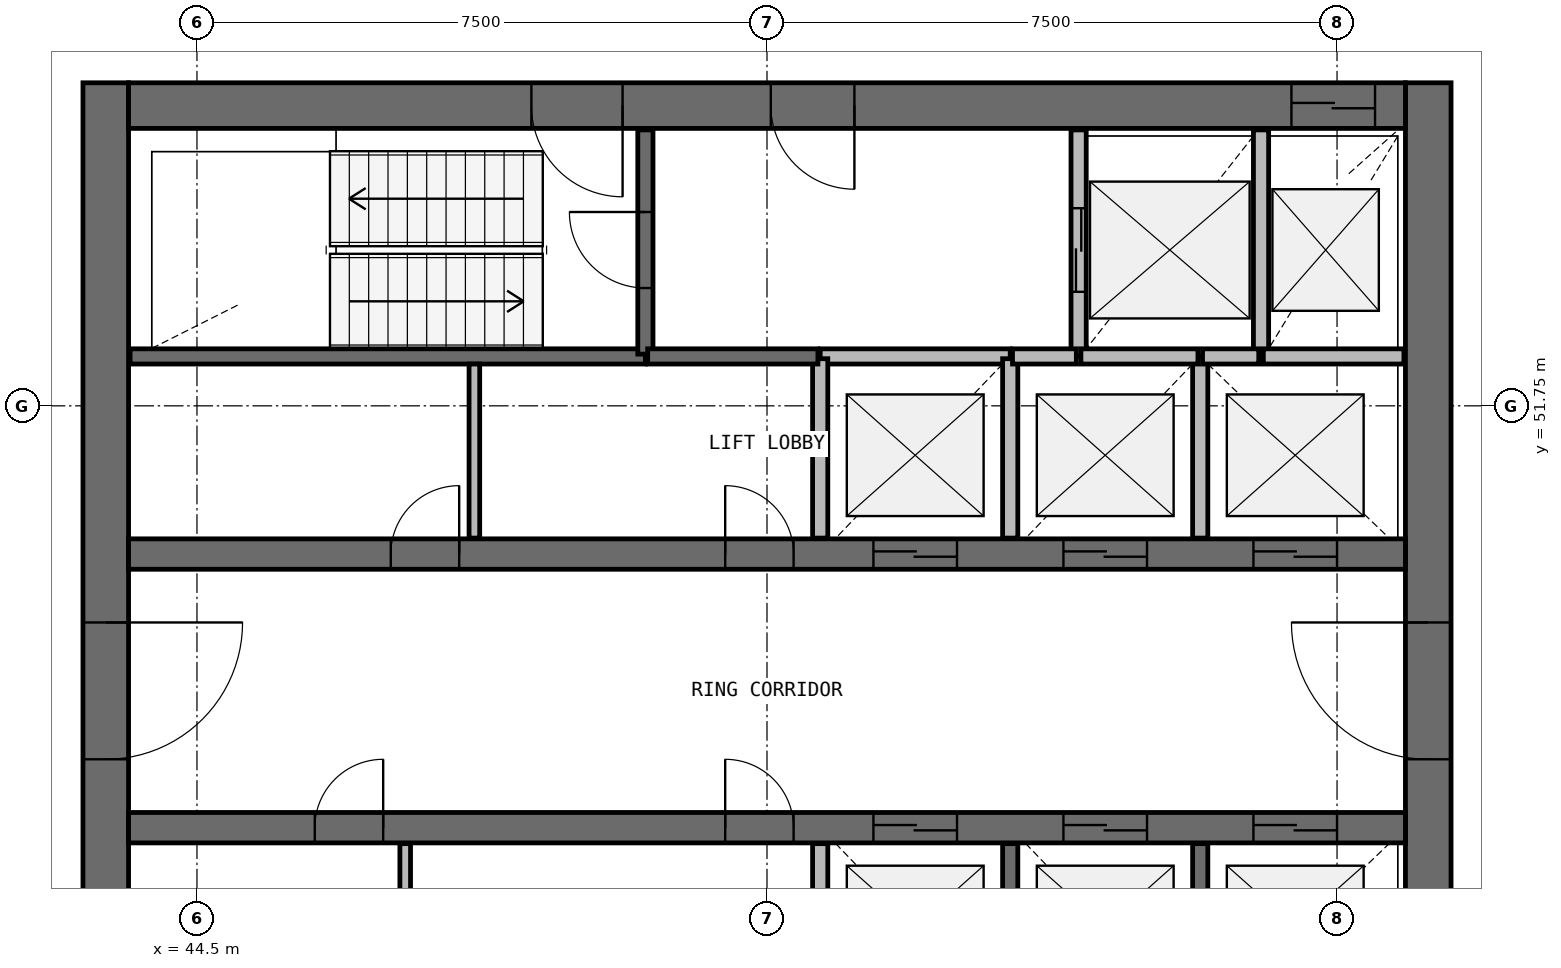
"""IFC4 building model, lengths in metres.
Left out: names, types, materials, properties, quantities, classifications, styles, units other than length and angle.
Written with IfcOpenShell. Run it as: python <this file> out.ifc"""

import sys

from ifc_helpers import new_model, si_unit, direction, frame, frame_2d, origin, place, context, subcontext, project, spatial, rectangle, extrude, source, transform, mapped, element, fill, save


model = new_model("IFC4")
c1 = context("Model", 3, precision=1e-05, world=origin(), true_north=direction((0.0, 1.0)))
c2 = subcontext(c1, "Body", "Model", "MODEL_VIEW")
j1 = project(units=[si_unit("LENGTHUNIT", "METRE"), si_unit("PLANEANGLEUNIT", "RADIAN")], contexts=[c1])
p1 = place(None, origin())
s1 = spatial("IfcSite", under=j1, at=p1, CompositionType="ELEMENT")
p2 = place(p1, origin())
s2 = spatial("IfcBuilding", under=s1, at=p2, CompositionType="ELEMENT")
p3 = place(p2, frame((0.0, 0.0, 207.2)))
s3 = spatial("IfcBuildingStorey", under=s2, at=p3, CompositionType="ELEMENT", Elevation=207.2)
p4 = place(p3, frame((60.7, 40.0, 0.0), z_axis=(0.0, 0.0, 1.0), x_axis=(0.0, 1.0, 0.0)))
e1 = element("IfcWall", 1, at=p4, inside=s3, PredefinedType="SHEAR", context=c2, shape_type="SweptSolid", body=[
    extrude(rectangle(XDim=16.0, YDim=0.6, at=frame_2d((8.0, 0.0))), origin(), (0.0, 0.0, 1.0), 3.9),
])
p5 = place(p4, frame((7.1, 0.0, 0.0)))
e2 = element("IfcOpeningElement", 2, at=p5, cuts=e1, PredefinedType="OPENING", context=c2, shape_type="SweptSolid", body=[
    extrude(rectangle(XDim=1.8, YDim=2.1, at=frame_2d((0.9, 1.05))), frame((0.0, 0.31, 0.0), z_axis=(0.0, -1.0, 0.0), x_axis=(1.0, 0.0, 0.0)), (0.0, 0.0, 1.0), 0.62),
])
p6 = place(p3, frame((43.3, 56.0, 0.0), z_axis=(0.0, 0.0, 1.0), x_axis=(0.0, -1.0, 0.0)))
e3 = element("IfcWall", 3, at=p6, inside=s3, PredefinedType="SHEAR", context=c2, shape_type="SweptSolid", body=[
    extrude(rectangle(XDim=16.0, YDim=0.6, at=frame_2d((8.0, 0.0))), origin(), (0.0, 0.0, 1.0), 3.9),
])
p7 = place(p6, frame((7.1, 0.0, 0.0)))
e4 = element("IfcOpeningElement", 4, at=p7, cuts=e3, PredefinedType="OPENING", context=c2, shape_type="SweptSolid", body=[
    extrude(rectangle(XDim=1.8, YDim=2.1, at=frame_2d((0.9, 1.05))), frame((0.0, 0.31, 0.0), z_axis=(0.0, -1.0, 0.0), x_axis=(1.0, 0.0, 0.0)), (0.0, 0.0, 1.0), 0.62),
])
p8 = place(p3, frame((60.4, 55.7, 0.0), z_axis=(0.0, 0.0, 1.0), x_axis=(-1.0, 0.0, 0.0)))
e5 = element("IfcWall", 5, at=p8, inside=s3, PredefinedType="SHEAR", context=c2, shape_type="SweptSolid", body=[
    extrude(rectangle(XDim=16.8, YDim=0.6, at=frame_2d((8.4, 0.0))), origin(), (0.0, 0.0, 1.0), 3.9),
])
p9 = place(p8, frame((0.4, 0.0, 0.0)))
e6 = element("IfcOpeningElement", 6, at=p9, cuts=e5, PredefinedType="OPENING", context=c2, shape_type="SweptSolid", body=[
    extrude(rectangle(XDim=1.1, YDim=2.1, at=frame_2d((0.55, 1.05))), frame((0.0, 0.31, 0.0), z_axis=(0.0, -1.0, 0.0), x_axis=(1.0, 0.0, 0.0)), (0.0, 0.0, 1.0), 0.62),
])
p10 = place(p8, frame((10.3, 0.0, 0.0)))
e7 = element("IfcOpeningElement", 7, at=p10, cuts=e5, PredefinedType="OPENING", context=c2, shape_type="SweptSolid", body=[
    extrude(rectangle(XDim=1.2, YDim=2.1, at=frame_2d((0.6, 1.05))), frame((0.0, 0.31, 0.0), z_axis=(0.0, -1.0, 0.0), x_axis=(1.0, 0.0, 0.0)), (0.0, 0.0, 1.0), 0.62),
])
p11 = place(p8, frame((7.25, 0.0, 0.0)))
e8 = element("IfcOpeningElement", 8, at=p11, cuts=e5, PredefinedType="OPENING", context=c2, shape_type="SweptSolid", body=[
    extrude(rectangle(XDim=1.1, YDim=2.1, at=frame_2d((0.55, 1.05))), frame((0.0, 0.31, 0.0), z_axis=(0.0, -1.0, 0.0), x_axis=(1.0, 0.0, 0.0)), (0.0, 0.0, 1.0), 0.62),
])
p12 = place(p3, frame((43.6, 49.8, 0.0), z_axis=(0.0, 0.0, 1.0), x_axis=(1.0, 0.0, 0.0)))
e9 = element("IfcWall", 9, at=p12, inside=s3, PredefinedType="SHEAR", context=c2, shape_type="SweptSolid", body=[
    extrude(rectangle(XDim=16.8, YDim=0.4, at=frame_2d((8.4, 0.0))), origin(), (0.0, 0.0, 1.0), 3.9),
])
p13 = place(p12, frame((9.8, 0.0, 0.0)))
e10 = element("IfcOpeningElement", 10, at=p13, cuts=e9, PredefinedType="OPENING", context=c2, shape_type="SweptSolid", body=[
    extrude(rectangle(XDim=1.1, YDim=2.1, at=frame_2d((0.55, 1.05))), frame((0.0, 0.21, 0.0), z_axis=(0.0, -1.0, 0.0), x_axis=(1.0, 0.0, 0.0)), (0.0, 0.0, 1.0), 0.42),
])
p14 = place(p12, frame((12.3, 0.0, 0.0)))
e11 = element("IfcOpeningElement", 11, at=p14, cuts=e9, PredefinedType="OPENING", context=c2, shape_type="SweptSolid", body=[
    extrude(rectangle(XDim=1.1, YDim=2.1, at=frame_2d((0.55, 1.05))), frame((0.0, 0.21, 0.0), z_axis=(0.0, -1.0, 0.0), x_axis=(1.0, 0.0, 0.0)), (0.0, 0.0, 1.0), 0.42),
])
p15 = place(p12, frame((14.8, 0.0, 0.0)))
e12 = element("IfcOpeningElement", 12, at=p15, cuts=e9, PredefinedType="OPENING", context=c2, shape_type="SweptSolid", body=[
    extrude(rectangle(XDim=1.1, YDim=2.1, at=frame_2d((0.55, 1.05))), frame((0.0, 0.21, 0.0), z_axis=(0.0, -1.0, 0.0), x_axis=(1.0, 0.0, 0.0)), (0.0, 0.0, 1.0), 0.42),
])
p16 = place(p12, frame((3.45, 0.0, 0.0)))
e13 = element("IfcOpeningElement", 13, at=p16, cuts=e9, PredefinedType="OPENING", context=c2, shape_type="SweptSolid", body=[
    extrude(rectangle(XDim=0.9, YDim=2.1, at=frame_2d((0.45, 1.05))), frame((0.0, 0.21, 0.0), z_axis=(0.0, -1.0, 0.0), x_axis=(1.0, 0.0, 0.0)), (0.0, 0.0, 1.0), 0.42),
])
p17 = place(p12, frame((7.85, 0.0, 0.0)))
e14 = element("IfcOpeningElement", 14, at=p17, cuts=e9, PredefinedType="OPENING", context=c2, shape_type="SweptSolid", body=[
    extrude(rectangle(XDim=0.9, YDim=2.1, at=frame_2d((0.45, 1.05))), frame((0.0, 0.21, 0.0), z_axis=(0.0, -1.0, 0.0), x_axis=(1.0, 0.0, 0.0)), (0.0, 0.0, 1.0), 0.42),
])
p18 = place(p3, frame((43.6, 46.2, 0.0), z_axis=(0.0, 0.0, 1.0), x_axis=(1.0, 0.0, 0.0)))
e15 = element("IfcWall", 15, at=p18, inside=s3, PredefinedType="SHEAR", context=c2, shape_type="SweptSolid", body=[
    extrude(rectangle(XDim=16.8, YDim=0.4, at=frame_2d((8.4, 0.0))), origin(), (0.0, 0.0, 1.0), 3.9),
])
p19 = place(p18, frame((9.8, 0.0, 0.0)))
e16 = element("IfcOpeningElement", 16, at=p19, cuts=e15, PredefinedType="OPENING", context=c2, shape_type="SweptSolid", body=[
    extrude(rectangle(XDim=1.1, YDim=2.1, at=frame_2d((0.55, 1.05))), frame((0.0, 0.21, 0.0), z_axis=(0.0, -1.0, 0.0), x_axis=(1.0, 0.0, 0.0)), (0.0, 0.0, 1.0), 0.42),
])
p20 = place(p18, frame((12.3, 0.0, 0.0)))
e17 = element("IfcOpeningElement", 17, at=p20, cuts=e15, PredefinedType="OPENING", context=c2, shape_type="SweptSolid", body=[
    extrude(rectangle(XDim=1.1, YDim=2.1, at=frame_2d((0.55, 1.05))), frame((0.0, 0.21, 0.0), z_axis=(0.0, -1.0, 0.0), x_axis=(1.0, 0.0, 0.0)), (0.0, 0.0, 1.0), 0.42),
])
p21 = place(p18, frame((14.8, 0.0, 0.0)))
e18 = element("IfcOpeningElement", 18, at=p21, cuts=e15, PredefinedType="OPENING", context=c2, shape_type="SweptSolid", body=[
    extrude(rectangle(XDim=1.1, YDim=2.1, at=frame_2d((0.55, 1.05))), frame((0.0, 0.21, 0.0), z_axis=(0.0, -1.0, 0.0), x_axis=(1.0, 0.0, 0.0)), (0.0, 0.0, 1.0), 0.42),
])
p22 = place(p18, frame((2.45, 0.0, 0.0)))
e19 = element("IfcOpeningElement", 19, at=p22, cuts=e15, PredefinedType="OPENING", context=c2, shape_type="SweptSolid", body=[
    extrude(rectangle(XDim=0.9, YDim=2.1, at=frame_2d((0.45, 1.05))), frame((0.0, 0.21, 0.0), z_axis=(0.0, -1.0, 0.0), x_axis=(1.0, 0.0, 0.0)), (0.0, 0.0, 1.0), 0.42),
])
p23 = place(p18, frame((7.85, 0.0, 0.0)))
e20 = element("IfcOpeningElement", 20, at=p23, cuts=e15, PredefinedType="OPENING", context=c2, shape_type="SweptSolid", body=[
    extrude(rectangle(XDim=0.9, YDim=2.1, at=frame_2d((0.45, 1.05))), frame((0.0, 0.21, 0.0), z_axis=(0.0, -1.0, 0.0), x_axis=(1.0, 0.0, 0.0)), (0.0, 0.0, 1.0), 0.42),
])
p24 = place(p3, frame((43.62, 52.4, 0.0), z_axis=(0.0, 0.0, 1.0), x_axis=(1.0, 0.0, 0.0)))
e21 = element("IfcWall", 21, at=p24, inside=s3, PredefinedType="SOLIDWALL", context=c2, shape_type="SweptSolid", body=[
    extrude(rectangle(XDim=6.78, YDim=0.2, at=frame_2d((3.39, 0.0))), origin(), (0.0, 0.0, 1.0), 3.58),
])
p25 = place(p3, frame((50.4, 52.43, 0.0), z_axis=(0.0, 0.0, 1.0), x_axis=(0.0, 1.0, 0.0)))
e22 = element("IfcWall", 22, at=p25, inside=s3, PredefinedType="SOLIDWALL", context=c2, shape_type="SweptSolid", body=[
    extrude(rectangle(XDim=2.95, YDim=0.2, at=frame_2d((1.475, 0.0))), origin(), (0.0, 0.0, 1.0), 3.58),
])
p26 = place(p25, frame((0.87, 0.0, 0.0)))
e23 = element("IfcOpeningElement", 23, at=p26, cuts=e22, PredefinedType="OPENING", context=c2, shape_type="SweptSolid", body=[
    extrude(rectangle(XDim=1.0, YDim=2.1, at=frame_2d((0.5, 1.05))), frame((0.0, 0.11, 0.0), z_axis=(0.0, -1.0, 0.0), x_axis=(1.0, 0.0, 0.0)), (0.0, 0.0, 1.0), 0.22),
])
p27 = place(p3, frame((56.1, 55.38, 0.0), z_axis=(0.0, 0.0, 1.0), x_axis=(0.0, -1.0, 0.0)))
e24 = element("IfcWall", 24, at=p27, inside=s3, PredefinedType="SOLIDWALL", context=c2, shape_type="SweptSolid", body=[
    extrude(rectangle(XDim=2.98, YDim=0.2, at=frame_2d((1.49, 0.0))), origin(), (0.0, 0.0, 1.0), 3.58),
])
p28 = place(p27, frame((1.03, 0.0, 0.0)))
e25 = element("IfcOpeningElement", 25, at=p28, cuts=e24, PredefinedType="OPENING", context=c2, shape_type="SweptSolid", body=[
    extrude(rectangle(XDim=1.1, YDim=2.1, at=frame_2d((0.55, 1.05))), frame((0.0, 0.11, 0.0), z_axis=(0.0, -1.0, 0.0), x_axis=(1.0, 0.0, 0.0)), (0.0, 0.0, 1.0), 0.22),
])
p29 = place(p3, frame((58.5, 52.4, 0.0), z_axis=(0.0, 0.0, 1.0), x_axis=(0.0, 1.0, 0.0)))
e26 = element("IfcWall", 26, at=p29, inside=s3, PredefinedType="SOLIDWALL", context=c2, shape_type="SweptSolid", body=[
    extrude(rectangle(XDim=2.98, YDim=0.2, at=frame_2d((1.49, 0.0))), origin(), (0.0, 0.0, 1.0), 3.58),
])
p30 = place(p3, frame((55.2, 52.4, 0.0), z_axis=(0.0, 0.0, 1.0), x_axis=(-1.0, 0.0, 0.0)))
e27 = element("IfcWall", 27, at=p30, inside=s3, PredefinedType="SOLIDWALL", context=c2, shape_type="SweptSolid", body=[
    extrude(rectangle(XDim=2.5, YDim=0.2, at=frame_2d((1.25, 0.0))), origin(), (0.0, 0.0, 1.0), 3.58),
])
for number, where, z_axis, x_axis in (
    (28, (52.7, 45.99, 0.0), (0.0, 0.0, 1.0), (0.0, -1.0, 0.0)),
    (29, (52.7, 52.37, 0.0), (0.0, 0.0, 1.0), (0.0, -1.0, 0.0)),
    (30, (55.2, 43.63, 0.0), (0.0, 0.0, 1.0), (0.0, 1.0, 0.0)),
    (31, (55.2, 50.01, 0.0), (0.0, 0.0, 1.0), (0.0, 1.0, 0.0)),
    (32, (57.7, 43.63, 0.0), (0.0, 0.0, 1.0), (0.0, 1.0, 0.0)),
):
    element("IfcWall", number, at=place(p3, frame(where, z_axis=z_axis, x_axis=x_axis)), inside=s3, PredefinedType="SOLIDWALL", context=c2, shape_type="SweptSolid", body=[
        extrude(rectangle(XDim=2.36, YDim=0.2, at=frame_2d((1.18, 0.0))), origin(), (0.0, 0.0, 1.0), 3.58),
    ])
p31 = place(p3, frame((57.7, 50.01, 0.0), z_axis=(0.0, 0.0, 1.0), x_axis=(0.0, 1.0, 0.0)))
e33 = element("IfcWall", 33, at=p31, inside=s3, PredefinedType="SOLIDWALL", context=c2, shape_type="SweptSolid", body=[
    extrude(rectangle(XDim=2.39, YDim=0.2, at=frame_2d((1.195, 0.0))), origin(), (0.0, 0.0, 1.0), 3.58),
])
p32 = place(p3, frame((50.43, 52.4, 0.0), z_axis=(0.0, 0.0, 1.0), x_axis=(1.0, 0.0, 0.0)))
e34 = element("IfcWall", 34, at=p32, inside=s3, PredefinedType="SOLIDWALL", context=c2, shape_type="SweptSolid", body=[
    extrude(rectangle(XDim=2.24, YDim=0.2, at=frame_2d((1.12, 0.0))), origin(), (0.0, 0.0, 1.0), 3.58),
])
p33 = place(p3, frame((60.38, 52.4, 0.0), z_axis=(0.0, 0.0, 1.0), x_axis=(-1.0, 0.0, 0.0)))
e35 = element("IfcWall", 35, at=p33, inside=s3, PredefinedType="SOLIDWALL", context=c2, shape_type="SweptSolid", body=[
    extrude(rectangle(XDim=1.85, YDim=0.2, at=frame_2d((0.925, 0.0))), origin(), (0.0, 0.0, 1.0), 3.58),
])
p34 = place(p3, frame((57.67, 52.4, 0.0), z_axis=(0.0, 0.0, 1.0), x_axis=(-1.0, 0.0, 0.0)))
e36 = element("IfcWall", 36, at=p34, inside=s3, PredefinedType="SOLIDWALL", context=c2, shape_type="SweptSolid", body=[
    extrude(rectangle(XDim=1.54, YDim=0.2, at=frame_2d((0.77, 0.0))), origin(), (0.0, 0.0, 1.0), 3.58),
])
p35 = place(p3, frame((56.07, 52.4, 0.0), z_axis=(0.0, 0.0, 1.0), x_axis=(-1.0, 0.0, 0.0)))
e37 = element("IfcWall", 37, at=p35, inside=s3, PredefinedType="SOLIDWALL", context=c2, shape_type="SweptSolid", body=[
    extrude(rectangle(XDim=0.84, YDim=0.2, at=frame_2d((0.42, 0.0))), origin(), (0.0, 0.0, 1.0), 3.58),
])
p36 = place(p3, frame((58.47, 52.4, 0.0), z_axis=(0.0, 0.0, 1.0), x_axis=(-1.0, 0.0, 0.0)))
e38 = element("IfcWall", 38, at=p36, inside=s3, PredefinedType="SOLIDWALL", context=c2, shape_type="SweptSolid", body=[
    extrude(rectangle(XDim=0.74, YDim=0.2, at=frame_2d((0.37, 0.0))), origin(), (0.0, 0.0, 1.0), 3.58),
])
for number, where, z_axis, x_axis in (
    (39, (47.24, 43.7, 0.0), (0.0, 0.0, 1.0), (0.0, 1.0, 0.0)),
    (40, (48.15, 50.01, 0.0), (0.0, 0.0, 1.0), (0.0, 1.0, 0.0)),
):
    element("IfcWall", number, at=place(p3, frame(where, z_axis=z_axis, x_axis=x_axis)), inside=s3, PredefinedType="PARTITIONING", context=c2, shape_type="SweptSolid", body=[
        extrude(rectangle(XDim=2.29, YDim=0.14, at=frame_2d((1.145, 0.0))), origin(), (0.0, 0.0, 1.0), 2.88),
    ])
m1 = source(origin(), c2, "Body", "SweptSolid", [
    extrude(rectangle(XDim=1.8, YDim=2.1, at=frame_2d((0.9, 1.05))), frame((0.0, 0.025, 0.0), z_axis=(0.0, -1.0, 0.0), x_axis=(1.0, 0.0, 0.0)), (0.0, 0.0, 1.0), 0.05),
])
p37 = place(p7, origin())
e41 = element("IfcDoor", 41, at=p37, inside=s3, OperationType="SINGLE_SWING_LEFT", PredefinedType="DOOR", context=c2, shape_type="MappedRepresentation", body=[
    mapped(m1, transform((0.0, 0.0, 0.0), scale=1.0)),
])
fill(e4, e41)
p38 = place(p5, origin())
e42 = element("IfcDoor", 42, at=p38, inside=s3, OperationType="SINGLE_SWING_RIGHT", PredefinedType="DOOR", context=c2, shape_type="MappedRepresentation", body=[
    mapped(m1, transform((0.0, 0.0, 0.0), scale=1.0)),
])
fill(e2, e42)
m2 = source(origin(), c2, "Body", "SweptSolid", [
    extrude(rectangle(XDim=1.1, YDim=2.1, at=frame_2d((0.55, 1.05))), frame((0.0, 0.025, 0.0), z_axis=(0.0, -1.0, 0.0), x_axis=(1.0, 0.0, 0.0)), (0.0, 0.0, 1.0), 0.05),
])
p39 = place(p13, origin())
e43 = element("IfcDoor", 43, at=p39, inside=s3, OperationType="DOUBLE_DOOR_SLIDING", PredefinedType="USERDEFINED", context=c2, shape_type="MappedRepresentation", body=[
    mapped(m2, transform((0.0, 0.0, 0.0), scale=1.0)),
])
fill(e10, e43)
p40 = place(p14, origin())
e44 = element("IfcDoor", 44, at=p40, inside=s3, OperationType="DOUBLE_DOOR_SLIDING", PredefinedType="USERDEFINED", context=c2, shape_type="MappedRepresentation", body=[
    mapped(m2, transform((0.0, 0.0, 0.0), scale=1.0)),
])
fill(e11, e44)
p41 = place(p15, origin())
e45 = element("IfcDoor", 45, at=p41, inside=s3, OperationType="DOUBLE_DOOR_SLIDING", PredefinedType="USERDEFINED", context=c2, shape_type="MappedRepresentation", body=[
    mapped(m2, transform((0.0, 0.0, 0.0), scale=1.0)),
])
fill(e12, e45)
p42 = place(p19, origin())
e46 = element("IfcDoor", 46, at=p42, inside=s3, OperationType="DOUBLE_DOOR_SLIDING", PredefinedType="USERDEFINED", context=c2, shape_type="MappedRepresentation", body=[
    mapped(m2, transform((0.0, 0.0, 0.0), scale=1.0)),
])
fill(e16, e46)
p43 = place(p20, origin())
e47 = element("IfcDoor", 47, at=p43, inside=s3, OperationType="DOUBLE_DOOR_SLIDING", PredefinedType="USERDEFINED", context=c2, shape_type="MappedRepresentation", body=[
    mapped(m2, transform((0.0, 0.0, 0.0), scale=1.0)),
])
fill(e17, e47)
p44 = place(p21, origin())
e48 = element("IfcDoor", 48, at=p44, inside=s3, OperationType="DOUBLE_DOOR_SLIDING", PredefinedType="USERDEFINED", context=c2, shape_type="MappedRepresentation", body=[
    mapped(m2, transform((0.0, 0.0, 0.0), scale=1.0)),
])
fill(e18, e48)
p45 = place(p28, origin())
e49 = element("IfcDoor", 49, at=p45, inside=s3, OperationType="DOUBLE_DOOR_SLIDING", PredefinedType="USERDEFINED", context=c2, shape_type="MappedRepresentation", body=[
    mapped(m2, transform((0.0, 0.0, 0.0), scale=1.0)),
])
fill(e25, e49)
p46 = place(p9, origin())
e50 = element("IfcDoor", 50, at=p46, inside=s3, OperationType="DOUBLE_DOOR_SLIDING", PredefinedType="USERDEFINED", context=c2, shape_type="MappedRepresentation", body=[
    mapped(m2, transform((0.0, 0.0, 0.0), scale=1.0)),
])
fill(e6, e50)
m3 = source(origin(), c2, "Body", "SweptSolid", [
    extrude(rectangle(XDim=1.2, YDim=2.1, at=frame_2d((0.6, 1.05))), frame((0.0, 0.025, 0.0), z_axis=(0.0, -1.0, 0.0), x_axis=(1.0, 0.0, 0.0)), (0.0, 0.0, 1.0), 0.05),
])
p47 = place(p10, origin())
e51 = element("IfcDoor", 51, at=p47, inside=s3, OperationType="SINGLE_SWING_LEFT", PredefinedType="DOOR", context=c2, shape_type="MappedRepresentation", body=[
    mapped(m3, transform((0.0, 0.0, 0.0), scale=1.0)),
])
fill(e7, e51)
m4 = source(origin(), c2, "Body", "SweptSolid", [
    extrude(rectangle(XDim=1.0, YDim=2.1, at=frame_2d((0.5, 1.05))), frame((0.0, 0.025, 0.0), z_axis=(0.0, -1.0, 0.0), x_axis=(1.0, 0.0, 0.0)), (0.0, 0.0, 1.0), 0.05),
])
p48 = place(p26, origin())
e52 = element("IfcDoor", 52, at=p48, inside=s3, OperationType="SINGLE_SWING_RIGHT", PredefinedType="DOOR", context=c2, shape_type="MappedRepresentation", body=[
    mapped(m4, transform((0.0, 0.0, 0.0), scale=1.0)),
])
fill(e23, e52)
m5 = source(origin(), c2, "Body", "SweptSolid", [
    extrude(rectangle(XDim=1.1, YDim=2.1, at=frame_2d((0.55, 1.05))), frame((0.0, 0.025, 0.0), z_axis=(0.0, -1.0, 0.0), x_axis=(1.0, 0.0, 0.0)), (0.0, 0.0, 1.0), 0.05),
])
p49 = place(p11, origin())
e53 = element("IfcDoor", 53, at=p49, inside=s3, OperationType="SINGLE_SWING_LEFT", PredefinedType="DOOR", context=c2, shape_type="MappedRepresentation", body=[
    mapped(m5, transform((0.0, 0.0, 0.0), scale=1.0)),
])
fill(e8, e53)
m6 = source(origin(), c2, "Body", "SweptSolid", [
    extrude(rectangle(XDim=0.9, YDim=2.1, at=frame_2d((0.45, 1.05))), frame((0.0, 0.025, 0.0), z_axis=(0.0, -1.0, 0.0), x_axis=(1.0, 0.0, 0.0)), (0.0, 0.0, 1.0), 0.05),
])
p50 = place(p16, origin())
e54 = element("IfcDoor", 54, at=p50, inside=s3, OperationType="SINGLE_SWING_RIGHT", PredefinedType="DOOR", context=c2, shape_type="MappedRepresentation", body=[
    mapped(m6, transform((0.0, 0.0, 0.0), scale=1.0)),
])
fill(e13, e54)
p51 = place(p17, origin())
e55 = element("IfcDoor", 55, at=p51, inside=s3, OperationType="SINGLE_SWING_LEFT", PredefinedType="DOOR", context=c2, shape_type="MappedRepresentation", body=[
    mapped(m6, transform((0.0, 0.0, 0.0), scale=1.0)),
])
fill(e14, e55)
p52 = place(p22, origin())
e56 = element("IfcDoor", 56, at=p52, inside=s3, OperationType="SINGLE_SWING_RIGHT", PredefinedType="DOOR", context=c2, shape_type="MappedRepresentation", body=[
    mapped(m6, transform((0.0, 0.0, 0.0), scale=1.0)),
])
fill(e19, e56)
p53 = place(p23, origin())
e57 = element("IfcDoor", 57, at=p53, inside=s3, OperationType="SINGLE_SWING_LEFT", PredefinedType="DOOR", context=c2, shape_type="MappedRepresentation", body=[
    mapped(m6, transform((0.0, 0.0, 0.0), scale=1.0)),
])
fill(e20, e57)
save(model, sys.argv[1])
